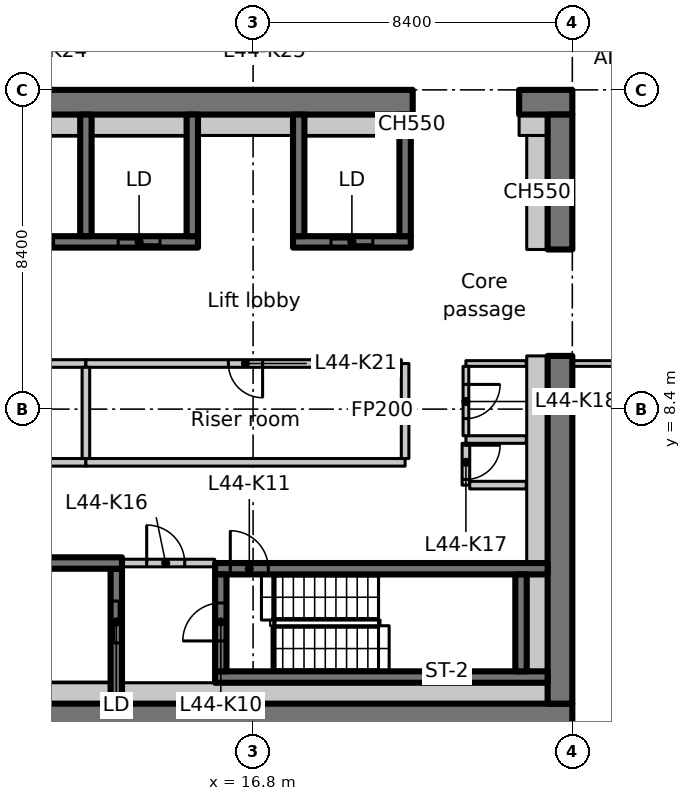
"""IFC4 building model, lengths in metres.
Left out: names, types, materials, properties, quantities, classifications, styles, units other than length and angle.
Written with IfcOpenShell. Run it as: python <this file> out.ifc"""

import sys

from ifc_helpers import new_model, si_unit, direction, frame, frame_2d, origin, place, context, subcontext, project, spatial, rectangle, extrude, element, fill, save


model = new_model("IFC4")
c1 = context("Model", 3, precision=1e-05, world=origin(), true_north=direction((0.0, 1.0)))
c2 = subcontext(c1, "Body", "Model", "MODEL_VIEW")
j1 = project(units=[si_unit("LENGTHUNIT", "METRE"), si_unit("PLANEANGLEUNIT", "RADIAN")], contexts=[c1])
p1 = place(None, origin())
s1 = spatial("IfcSite", under=j1, at=p1, CompositionType="ELEMENT")
p2 = place(p1, origin())
s2 = spatial("IfcBuilding", under=s1, at=p2, CompositionType="ELEMENT")
p3 = place(p2, frame((0.0, 0.0, 177.6)))
s3 = spatial("IfcBuildingStorey", under=s2, at=p3, CompositionType="ELEMENT", Elevation=177.6)
p4 = place(p3, frame((7.286, 0.325, 0.0), z_axis=(0.0, 0.0, 1.0), x_axis=(1.0, 0.0, 0.0)))
e1 = element("IfcWall", 1, at=p4, inside=s3, PredefinedType="SHEAR", context=c2, shape_type="SweptSolid", body=[
    extrude(rectangle(XDim=17.914, YDim=0.65, at=frame_2d((8.957, 0.0))), origin(), (0.0, 0.0, 1.0), 3.35),
])
p5 = place(p3, frame((-1.1, 16.475, 0.0), z_axis=(0.0, 0.0, 1.0), x_axis=(1.0, 0.0, 0.0)))
e2 = element("IfcWall", 2, at=p5, inside=s3, PredefinedType="SHEAR", context=c2, shape_type="SweptSolid", body=[
    extrude(rectangle(XDim=22.1, YDim=0.65, at=frame_2d((11.05, 0.0))), origin(), (0.0, 0.0, 1.0), 3.35),
])
p6 = place(p5, frame((3.15, 0.0, 0.0)))
e3 = element("IfcOpeningElement", 3, at=p6, cuts=e2, PredefinedType="OPENING", context=c2, shape_type="SweptSolid", body=[
    extrude(rectangle(XDim=1.1, YDim=2.3, at=frame_2d((0.55, 1.15))), frame((0.0, 0.335, 0.0), z_axis=(0.0, -1.0, 0.0), x_axis=(1.0, 0.0, 0.0)), (0.0, 0.0, 1.0), 0.67),
])
p7 = place(p3, frame((23.8, 16.475, 0.0), z_axis=(0.0, 0.0, 1.0), x_axis=(1.0, 0.0, 0.0)))
e4 = element("IfcWall", 4, at=p7, inside=s3, PredefinedType="SHEAR", context=c2, shape_type="SweptSolid", body=[
    extrude(rectangle(XDim=1.4, YDim=0.65, at=frame_2d((0.7, 0.0))), origin(), (0.0, 0.0, 1.0), 3.35),
])
p8 = place(p3, frame((24.875, 0.65, 0.0), z_axis=(0.0, 0.0, 1.0), x_axis=(0.0, 1.0, 0.0)))
e5 = element("IfcWall", 5, at=p8, inside=s3, PredefinedType="SHEAR", context=c2, shape_type="SweptSolid", body=[
    extrude(rectangle(XDim=9.15, YDim=0.65, at=frame_2d((4.575, 0.0))), origin(), (0.0, 0.0, 1.0), 3.35),
])
p9 = place(p3, frame((24.875, 12.6, 0.0), z_axis=(0.0, 0.0, 1.0), x_axis=(0.0, 1.0, 0.0)))
e6 = element("IfcWall", 6, at=p9, inside=s3, PredefinedType="SHEAR", context=c2, shape_type="SweptSolid", body=[
    extrude(rectangle(XDim=3.55, YDim=0.65, at=frame_2d((1.775, 0.0))), origin(), (0.0, 0.0, 1.0), 3.35),
])
p10 = place(p3, frame((24.275, 12.6, 0.0), z_axis=(0.0, 0.0, 1.0), x_axis=(0.0, 1.0, 0.0)))
e7 = element("IfcWall", 7, at=p10, inside=s3, PredefinedType="PARTITIONING", context=c2, shape_type="SweptSolid", body=[
    extrude(rectangle(XDim=3.0, YDim=0.55, at=frame_2d((1.5, 0.0))), origin(), (0.0, 0.0, 1.0), 3.35),
])
p11 = place(p3, frame((23.8, 15.875, 0.0), z_axis=(0.0, 0.0, 1.0), x_axis=(1.0, 0.0, 0.0)))
e8 = element("IfcWall", 8, at=p11, inside=s3, PredefinedType="PARTITIONING", context=c2, shape_type="SweptSolid", body=[
    extrude(rectangle(XDim=0.75, YDim=0.55, at=frame_2d((0.375, 0.0))), origin(), (0.0, 0.0, 1.0), 3.35),
])
p12 = place(p3, frame((0.65, 12.8, 0.0), z_axis=(0.0, 0.0, 1.0), x_axis=(1.0, 0.0, 0.0)))
e9 = element("IfcWall", 9, at=p12, inside=s3, PredefinedType="SHEAR", context=c2, shape_type="SweptSolid", body=[
    extrude(rectangle(XDim=14.7, YDim=0.3, at=frame_2d((7.35, 0.0))), origin(), (0.0, 0.0, 1.0), 3.35),
])
p13 = place(p12, frame((4.2, 0.0, 0.0)))
e10 = element("IfcOpeningElement", 10, at=p13, cuts=e9, PredefinedType="OPENING", context=c2, shape_type="SweptSolid", body=[
    extrude(rectangle(XDim=1.1, YDim=2.3, at=frame_2d((0.55, 1.15))), frame((0.0, 0.16, 0.0), z_axis=(0.0, -1.0, 0.0), x_axis=(1.0, 0.0, 0.0)), (0.0, 0.0, 1.0), 0.32),
])
p14 = place(p12, frame((7.0, 0.0, 0.0)))
e11 = element("IfcOpeningElement", 11, at=p14, cuts=e9, PredefinedType="OPENING", context=c2, shape_type="SweptSolid", body=[
    extrude(rectangle(XDim=1.1, YDim=2.3, at=frame_2d((0.55, 1.15))), frame((0.0, 0.16, 0.0), z_axis=(0.0, -1.0, 0.0), x_axis=(1.0, 0.0, 0.0)), (0.0, 0.0, 1.0), 0.32),
])
p15 = place(p12, frame((9.8, 0.0, 0.0)))
e12 = element("IfcOpeningElement", 12, at=p15, cuts=e9, PredefinedType="OPENING", context=c2, shape_type="SweptSolid", body=[
    extrude(rectangle(XDim=1.1, YDim=2.3, at=frame_2d((0.55, 1.15))), frame((0.0, 0.16, 0.0), z_axis=(0.0, -1.0, 0.0), x_axis=(1.0, 0.0, 0.0)), (0.0, 0.0, 1.0), 0.32),
])
p16 = place(p12, frame((12.6, 0.0, 0.0)))
e13 = element("IfcOpeningElement", 13, at=p16, cuts=e9, PredefinedType="OPENING", context=c2, shape_type="SweptSolid", body=[
    extrude(rectangle(XDim=1.1, YDim=2.3, at=frame_2d((0.55, 1.15))), frame((0.0, 0.16, 0.0), z_axis=(0.0, -1.0, 0.0), x_axis=(1.0, 0.0, 0.0)), (0.0, 0.0, 1.0), 0.32),
])
for number, where, z_axis, x_axis in (
    (14, (12.4, 12.95, 0.0), (0.0, 0.0, 1.0), (0.0, 1.0, 0.0)),
    (15, (15.2, 12.95, 0.0), (0.0, 0.0, 1.0), (0.0, 1.0, 0.0)),
):
    element("IfcWall", number, at=place(p3, frame(where, z_axis=z_axis, x_axis=x_axis)), inside=s3, PredefinedType="SHEAR", context=c2, shape_type="SweptSolid", body=[
        extrude(rectangle(XDim=3.2, YDim=0.3, at=frame_2d((1.6, 0.0))), origin(), (0.0, 0.0, 1.0), 3.35),
    ])
p17 = place(p3, frame((17.85, 12.8, 0.0), z_axis=(0.0, 0.0, 1.0), x_axis=(1.0, 0.0, 0.0)))
e16 = element("IfcWall", 16, at=p17, inside=s3, PredefinedType="SHEAR", context=c2, shape_type="SweptSolid", body=[
    extrude(rectangle(XDim=3.1, YDim=0.3, at=frame_2d((1.55, 0.0))), origin(), (0.0, 0.0, 1.0), 3.35),
])
p18 = place(p17, frame((1.0, 0.0, 0.0)))
e17 = element("IfcOpeningElement", 17, at=p18, cuts=e16, PredefinedType="OPENING", context=c2, shape_type="SweptSolid", body=[
    extrude(rectangle(XDim=1.1, YDim=2.3, at=frame_2d((0.55, 1.15))), frame((0.0, 0.16, 0.0), z_axis=(0.0, -1.0, 0.0), x_axis=(1.0, 0.0, 0.0)), (0.0, 0.0, 1.0), 0.32),
])
for number, where, z_axis, x_axis in (
    (18, (18.0, 12.95, 0.0), (0.0, 0.0, 1.0), (0.0, 1.0, 0.0)),
    (19, (20.8, 12.95, 0.0), (0.0, 0.0, 1.0), (0.0, 1.0, 0.0)),
):
    element("IfcWall", number, at=place(p3, frame(where, z_axis=z_axis, x_axis=x_axis)), inside=s3, PredefinedType="SHEAR", context=c2, shape_type="SweptSolid", body=[
        extrude(rectangle(XDim=3.2, YDim=0.3, at=frame_2d((1.6, 0.0))), origin(), (0.0, 0.0, 1.0), 3.35),
    ])
p19 = place(p3, frame((13.2, 0.65, 0.0), z_axis=(0.0, 0.0, 1.0), x_axis=(0.0, 1.0, 0.0)))
e20 = element("IfcWall", 20, at=p19, inside=s3, PredefinedType="SHEAR", context=c2, shape_type="SweptSolid", body=[
    extrude(rectangle(XDim=3.55, YDim=0.3, at=frame_2d((1.775, 0.0))), origin(), (0.0, 0.0, 1.0), 3.35),
])
p20 = place(p19, frame((1.6, 0.0, 0.0)))
e21 = element("IfcOpeningElement", 21, at=p20, cuts=e20, PredefinedType="OPENING", context=c2, shape_type="SweptSolid", body=[
    extrude(rectangle(XDim=1.1, YDim=2.3, at=frame_2d((0.55, 1.15))), frame((0.0, 0.16, 0.0), z_axis=(0.0, -1.0, 0.0), x_axis=(1.0, 0.0, 0.0)), (0.0, 0.0, 1.0), 0.32),
])
p21 = place(p3, frame((10.05, 4.35, 0.0), z_axis=(0.0, 0.0, 1.0), x_axis=(1.0, 0.0, 0.0)))
e22 = element("IfcWall", 22, at=p21, inside=s3, PredefinedType="SHEAR", context=c2, shape_type="SweptSolid", body=[
    extrude(rectangle(XDim=3.3, YDim=0.3, at=frame_2d((1.65, 0.0))), origin(), (0.0, 0.0, 1.0), 3.35),
])
p22 = place(p3, frame((15.8, 1.35, 0.0), z_axis=(0.0, 0.0, 1.0), x_axis=(1.0, 0.0, 0.0)))
e23 = element("IfcWall", 23, at=p22, inside=s3, PredefinedType="SHEAR", context=c2, shape_type="SweptSolid", body=[
    extrude(rectangle(XDim=8.75, YDim=0.3, at=frame_2d((4.375, 0.0))), origin(), (0.0, 0.0, 1.0), 3.35),
])
p23 = place(p3, frame((15.8, 4.2, 0.0), z_axis=(0.0, 0.0, 1.0), x_axis=(1.0, 0.0, 0.0)))
e24 = element("IfcWall", 24, at=p23, inside=s3, PredefinedType="SHEAR", context=c2, shape_type="SweptSolid", body=[
    extrude(rectangle(XDim=8.75, YDim=0.3, at=frame_2d((4.375, 0.0))), origin(), (0.0, 0.0, 1.0), 3.35),
])
p24 = place(p23, frame((0.4, 0.0, 0.0)))
e25 = element("IfcOpeningElement", 25, at=p24, cuts=e24, PredefinedType="OPENING", context=c2, shape_type="SweptSolid", body=[
    extrude(rectangle(XDim=1.0, YDim=2.1, at=frame_2d((0.5, 1.05))), frame((0.0, 0.16, 0.0), z_axis=(0.0, -1.0, 0.0), x_axis=(1.0, 0.0, 0.0)), (0.0, 0.0, 1.0), 0.32),
])
p25 = place(p3, frame((15.95, 1.5, 0.0), z_axis=(0.0, 0.0, 1.0), x_axis=(0.0, 1.0, 0.0)))
e26 = element("IfcWall", 26, at=p25, inside=s3, PredefinedType="SHEAR", context=c2, shape_type="SweptSolid", body=[
    extrude(rectangle(XDim=2.55, YDim=0.3, at=frame_2d((1.275, 0.0))), origin(), (0.0, 0.0, 1.0), 3.35),
])
p26 = place(p25, frame((0.8, 0.0, 0.0)))
e27 = element("IfcOpeningElement", 27, at=p26, cuts=e26, PredefinedType="OPENING", context=c2, shape_type="SweptSolid", body=[
    extrude(rectangle(XDim=1.0, YDim=2.1, at=frame_2d((0.5, 1.05))), frame((0.0, 0.16, 0.0), z_axis=(0.0, -1.0, 0.0), x_axis=(1.0, 0.0, 0.0)), (0.0, 0.0, 1.0), 0.32),
])
p27 = place(p3, frame((23.85, 1.5, 0.0), z_axis=(0.0, 0.0, 1.0), x_axis=(0.0, 1.0, 0.0)))
e28 = element("IfcWall", 28, at=p27, inside=s3, PredefinedType="SHEAR", context=c2, shape_type="SweptSolid", body=[
    extrude(rectangle(XDim=2.55, YDim=0.3, at=frame_2d((1.275, 0.0))), origin(), (0.0, 0.0, 1.0), 3.35),
])
p28 = place(p3, frame((13.362, 4.35, 0.0), z_axis=(0.0, 0.0, 1.0), x_axis=(1.0, 0.0, 0.0)))
e29 = element("IfcWall", 29, at=p28, inside=s3, PredefinedType="PARTITIONING", context=c2, shape_type="SweptSolid", body=[
    extrude(rectangle(XDim=2.426, YDim=0.2, at=frame_2d((1.213, 0.0))), origin(), (0.0, 0.0, 1.0), 3.35),
])
p29 = place(p28, frame((0.638, 0.0, 0.0)))
e30 = element("IfcOpeningElement", 30, at=p29, cuts=e29, PredefinedType="OPENING", context=c2, shape_type="SweptSolid", body=[
    extrude(rectangle(XDim=1.0, YDim=2.1, at=frame_2d((0.5, 1.05))), frame((0.0, 0.11, 0.0), z_axis=(0.0, -1.0, 0.0), x_axis=(1.0, 0.0, 0.0)), (0.0, 0.0, 1.0), 0.22),
])
p30 = place(p3, frame((6.8, 7.0, 0.0), z_axis=(0.0, 0.0, 1.0), x_axis=(1.0, 0.0, 0.0)))
e31 = element("IfcWall", 31, at=p30, inside=s3, PredefinedType="PARTITIONING", context=c2, shape_type="SweptSolid", body=[
    extrude(rectangle(XDim=5.6, YDim=0.2, at=frame_2d((2.8, 0.0))), origin(), (0.0, 0.0, 1.0), 3.35),
])
p31 = place(p3, frame((12.4, 9.6, 0.0), z_axis=(0.0, 0.0, 1.0), x_axis=(-1.0, 0.0, 0.0)))
e32 = element("IfcWall", 32, at=p31, inside=s3, PredefinedType="PARTITIONING", context=c2, shape_type="SweptSolid", body=[
    extrude(rectangle(XDim=5.5, YDim=0.2, at=frame_2d((2.75, 0.0))), origin(), (0.0, 0.0, 1.0), 3.35),
])
p32 = place(p31, frame((2.35, 0.0, 0.0)))
e33 = element("IfcOpeningElement", 33, at=p32, cuts=e32, PredefinedType="OPENING", context=c2, shape_type="SweptSolid", body=[
    extrude(rectangle(XDim=0.9, YDim=2.1, at=frame_2d((0.45, 1.05))), frame((0.0, 0.11, 0.0), z_axis=(0.0, -1.0, 0.0), x_axis=(1.0, 0.0, 0.0)), (0.0, 0.0, 1.0), 0.22),
])
p33 = place(p3, frame((12.4, 7.0, 0.0), z_axis=(0.0, 0.0, 1.0), x_axis=(1.0, 0.0, 0.0)))
e34 = element("IfcWall", 34, at=p33, inside=s3, PredefinedType="PARTITIONING", context=c2, shape_type="SweptSolid", body=[
    extrude(rectangle(XDim=8.4, YDim=0.2, at=frame_2d((4.2, 0.0))), origin(), (0.0, 0.0, 1.0), 3.35),
])
p34 = place(p3, frame((20.8, 7.1, 0.0), z_axis=(0.0, 0.0, 1.0), x_axis=(0.0, 1.0, 0.0)))
e35 = element("IfcWall", 35, at=p34, inside=s3, PredefinedType="PARTITIONING", context=c2, shape_type="SweptSolid", body=[
    extrude(rectangle(XDim=2.5, YDim=0.2, at=frame_2d((1.25, 0.0))), origin(), (0.0, 0.0, 1.0), 3.35),
])
p35 = place(p3, frame((20.7, 9.6, 0.0), z_axis=(0.0, 0.0, 1.0), x_axis=(-1.0, 0.0, 0.0)))
e36 = element("IfcWall", 36, at=p35, inside=s3, PredefinedType="PARTITIONING", context=c2, shape_type="SweptSolid", body=[
    extrude(rectangle(XDim=8.3, YDim=0.2, at=frame_2d((4.15, 0.0))), origin(), (0.0, 0.0, 1.0), 3.35),
])
p36 = place(p35, frame((3.65, 0.0, 0.0)))
e37 = element("IfcOpeningElement", 37, at=p36, cuts=e36, PredefinedType="OPENING", context=c2, shape_type="SweptSolid", body=[
    extrude(rectangle(XDim=0.9, YDim=2.1, at=frame_2d((0.45, 1.05))), frame((0.0, 0.11, 0.0), z_axis=(0.0, -1.0, 0.0), x_axis=(1.0, 0.0, 0.0)), (0.0, 0.0, 1.0), 0.22),
])
p37 = place(p3, frame((12.4, 9.5, 0.0), z_axis=(0.0, 0.0, 1.0), x_axis=(0.0, -1.0, 0.0)))
e38 = element("IfcWall", 38, at=p37, inside=s3, PredefinedType="PARTITIONING", context=c2, shape_type="SweptSolid", body=[
    extrude(rectangle(XDim=2.4, YDim=0.2, at=frame_2d((1.2, 0.0))), origin(), (0.0, 0.0, 1.0), 3.35),
])
p38 = place(p3, frame((23.988, 7.6, 0.0), z_axis=(0.0, 0.0, 1.0), x_axis=(-1.0, 0.0, 0.0)))
e39 = element("IfcWall", 39, at=p38, inside=s3, PredefinedType="PARTITIONING", context=c2, shape_type="SweptSolid", body=[
    extrude(rectangle(XDim=1.588, YDim=0.2, at=frame_2d((0.794, 0.0))), origin(), (0.0, 0.0, 1.0), 3.35),
])
p39 = place(p3, frame((22.4, 7.5, 0.0), z_axis=(0.0, 0.0, 1.0), x_axis=(0.0, -1.0, 0.0)))
e40 = element("IfcWall", 40, at=p39, inside=s3, PredefinedType="PARTITIONING", context=c2, shape_type="SweptSolid", body=[
    extrude(rectangle(XDim=1.1, YDim=0.2, at=frame_2d((0.55, 0.0))), origin(), (0.0, 0.0, 1.0), 3.35),
])
p40 = place(p39, frame((0.05, 0.0, 0.0)))
e41 = element("IfcOpeningElement", 41, at=p40, cuts=e40, PredefinedType="OPENING", context=c2, shape_type="SweptSolid", body=[
    extrude(rectangle(XDim=0.9, YDim=2.1, at=frame_2d((0.45, 1.05))), frame((0.0, 0.11, 0.0), z_axis=(0.0, -1.0, 0.0), x_axis=(1.0, 0.0, 0.0)), (0.0, 0.0, 1.0), 0.22),
])
p41 = place(p3, frame((22.5, 6.4, 0.0), z_axis=(0.0, 0.0, 1.0), x_axis=(1.0, 0.0, 0.0)))
e42 = element("IfcWall", 42, at=p41, inside=s3, PredefinedType="PARTITIONING", context=c2, shape_type="SweptSolid", body=[
    extrude(rectangle(XDim=1.488, YDim=0.2, at=frame_2d((0.744, 0.0))), origin(), (0.0, 0.0, 1.0), 3.35),
])
p42 = place(p3, frame((23.988, 9.6, 0.0), z_axis=(0.0, 0.0, 1.0), x_axis=(-1.0, 0.0, 0.0)))
e43 = element("IfcWall", 43, at=p42, inside=s3, PredefinedType="PARTITIONING", context=c2, shape_type="SweptSolid", body=[
    extrude(rectangle(XDim=1.588, YDim=0.15, at=frame_2d((0.794, 0.0))), origin(), (0.0, 0.0, 1.0), 3.35),
])
p43 = place(p3, frame((22.4, 9.525, 0.0), z_axis=(0.0, 0.0, 1.0), x_axis=(0.0, -1.0, 0.0)))
e44 = element("IfcWall", 44, at=p43, inside=s3, PredefinedType="PARTITIONING", context=c2, shape_type="SweptSolid", body=[
    extrude(rectangle(XDim=1.825, YDim=0.15, at=frame_2d((0.913, 0.0))), origin(), (0.0, 0.0, 1.0), 3.35),
])
p44 = place(p43, frame((0.475, 0.0, 0.0)))
e45 = element("IfcOpeningElement", 45, at=p44, cuts=e44, PredefinedType="OPENING", context=c2, shape_type="SweptSolid", body=[
    extrude(rectangle(XDim=0.9, YDim=2.1, at=frame_2d((0.45, 1.05))), frame((0.0, 0.085, 0.0), z_axis=(0.0, -1.0, 0.0), x_axis=(1.0, 0.0, 0.0)), (0.0, 0.0, 1.0), 0.17),
])
for number, where, z_axis, x_axis in (
    (46, (9.75, 15.875, 0.0), (0.0, 0.0, 1.0), (1.0, 0.0, 0.0)),
    (47, (12.55, 15.875, 0.0), (0.0, 0.0, 1.0), (1.0, 0.0, 0.0)),
    (48, (15.35, 15.875, 0.0), (0.0, 0.0, 1.0), (1.0, 0.0, 0.0)),
    (49, (18.15, 15.875, 0.0), (0.0, 0.0, 1.0), (1.0, 0.0, 0.0)),
):
    element("IfcWall", number, at=place(p3, frame(where, z_axis=z_axis, x_axis=x_axis)), inside=s3, PredefinedType="PARTITIONING", context=c2, shape_type="SweptSolid", body=[
        extrude(rectangle(XDim=2.5, YDim=0.55, at=frame_2d((1.25, 0.0))), origin(), (0.0, 0.0, 1.0), 3.35),
    ])
p45 = place(p3, frame((20.95, 15.875, 0.0), z_axis=(0.0, 0.0, 1.0), x_axis=(1.0, 0.0, 0.0)))
e50 = element("IfcWall", 50, at=p45, inside=s3, PredefinedType="PARTITIONING", context=c2, shape_type="SweptSolid", body=[
    extrude(rectangle(XDim=0.05, YDim=0.55, at=frame_2d((0.025, 0.0))), origin(), (0.0, 0.0, 1.0), 3.35),
])
p46 = place(p3, frame((10.35, 0.925, 0.0), z_axis=(0.0, 0.0, 1.0), x_axis=(1.0, 0.0, 0.0)))
e51 = element("IfcWall", 51, at=p46, inside=s3, PredefinedType="PARTITIONING", context=c2, shape_type="SweptSolid", body=[
    extrude(rectangle(XDim=2.7, YDim=0.55, at=frame_2d((1.35, 0.0))), origin(), (0.0, 0.0, 1.0), 3.35),
])
p47 = place(p3, frame((13.35, 0.925, 0.0), z_axis=(0.0, 0.0, 1.0), x_axis=(1.0, 0.0, 0.0)))
e52 = element("IfcWall", 52, at=p47, inside=s3, PredefinedType="PARTITIONING", context=c2, shape_type="SweptSolid", body=[
    extrude(rectangle(XDim=11.2, YDim=0.55, at=frame_2d((5.6, 0.0))), origin(), (0.0, 0.0, 1.0), 3.35),
])
p48 = place(p3, frame((24.275, 1.5, 0.0), z_axis=(0.0, 0.0, 1.0), x_axis=(0.0, 1.0, 0.0)))
e53 = element("IfcWall", 53, at=p48, inside=s3, PredefinedType="PARTITIONING", context=c2, shape_type="SweptSolid", body=[
    extrude(rectangle(XDim=2.55, YDim=0.55, at=frame_2d((1.275, 0.0))), origin(), (0.0, 0.0, 1.0), 3.35),
])
p49 = place(p3, frame((24.275, 4.35, 0.0), z_axis=(0.0, 0.0, 1.0), x_axis=(0.0, 1.0, 0.0)))
e54 = element("IfcWall", 54, at=p49, inside=s3, PredefinedType="PARTITIONING", context=c2, shape_type="SweptSolid", body=[
    extrude(rectangle(XDim=5.45, YDim=0.55, at=frame_2d((2.725, 0.0))), origin(), (0.0, 0.0, 1.0), 3.35),
])
p50 = place(p3, frame((29.4, 9.6, 0.0), z_axis=(0.0, 0.0, 1.0), x_axis=(-1.0, 0.0, 0.0)))
e55 = element("IfcWall", 55, at=p50, inside=s3, PredefinedType="PARTITIONING", context=c2, shape_type="SweptSolid", body=[
    extrude(rectangle(XDim=4.2, YDim=0.15, at=frame_2d((2.1, 0.0))), origin(), (0.0, 0.0, 1.0), 3.33),
])
p51 = place(p15, origin())
e56 = element("IfcDoor", 56, at=p51, inside=s3, OperationType="SLIDING_TO_LEFT", PredefinedType="DOOR", context=c2, shape_type="SweptSolid", body=[
    extrude(rectangle(XDim=1.1, YDim=2.3, at=frame_2d((0.55, 1.15))), frame((0.0, 0.025, 0.0), z_axis=(0.0, -1.0, 0.0), x_axis=(1.0, 0.0, 0.0)), (0.0, 0.0, 1.0), 0.05),
])
fill(e12, e56)
p52 = place(p16, origin())
e57 = element("IfcDoor", 57, at=p52, inside=s3, OperationType="SLIDING_TO_LEFT", PredefinedType="DOOR", context=c2, shape_type="SweptSolid", body=[
    extrude(rectangle(XDim=1.1, YDim=2.3, at=frame_2d((0.55, 1.15))), frame((0.0, 0.025, 0.0), z_axis=(0.0, -1.0, 0.0), x_axis=(1.0, 0.0, 0.0)), (0.0, 0.0, 1.0), 0.05),
])
fill(e13, e57)
p53 = place(p18, origin())
e58 = element("IfcDoor", 58, at=p53, inside=s3, OperationType="SLIDING_TO_LEFT", PredefinedType="DOOR", context=c2, shape_type="SweptSolid", body=[
    extrude(rectangle(XDim=1.1, YDim=2.3, at=frame_2d((0.55, 1.15))), frame((0.0, 0.025, 0.0), z_axis=(0.0, -1.0, 0.0), x_axis=(1.0, 0.0, 0.0)), (0.0, 0.0, 1.0), 0.05),
])
fill(e17, e58)
p54 = place(p20, origin())
e59 = element("IfcDoor", 59, at=p54, inside=s3, OperationType="SLIDING_TO_LEFT", PredefinedType="DOOR", context=c2, shape_type="SweptSolid", body=[
    extrude(rectangle(XDim=1.1, YDim=2.3, at=frame_2d((0.55, 1.15))), frame((0.0, 0.025, 0.0), z_axis=(0.0, -1.0, 0.0), x_axis=(1.0, 0.0, 0.0)), (0.0, 0.0, 1.0), 0.05),
])
fill(e21, e59)
p55 = place(p26, origin())
e60 = element("IfcDoor", 60, at=p55, inside=s3, OperationType="SINGLE_SWING_LEFT", PredefinedType="DOOR", context=c2, shape_type="SweptSolid", body=[
    extrude(rectangle(XDim=1.0, YDim=2.1, at=frame_2d((0.5, 1.05))), frame((0.0, 0.025, 0.0), z_axis=(0.0, -1.0, 0.0), x_axis=(1.0, 0.0, 0.0)), (0.0, 0.0, 1.0), 0.05),
])
fill(e27, e60)
p56 = place(p24, origin())
e61 = element("IfcDoor", 61, at=p56, inside=s3, OperationType="SINGLE_SWING_RIGHT", PredefinedType="DOOR", context=c2, shape_type="SweptSolid", body=[
    extrude(rectangle(XDim=1.0, YDim=2.1, at=frame_2d((0.5, 1.05))), frame((0.0, 0.025, 0.0), z_axis=(0.0, -1.0, 0.0), x_axis=(1.0, 0.0, 0.0)), (0.0, 0.0, 1.0), 0.05),
])
fill(e25, e61)
p57 = place(p29, origin())
e62 = element("IfcDoor", 62, at=p57, inside=s3, OperationType="SINGLE_SWING_LEFT", PredefinedType="DOOR", context=c2, shape_type="SweptSolid", body=[
    extrude(rectangle(XDim=1.0, YDim=2.1, at=frame_2d((0.5, 1.05))), frame((0.0, 0.025, 0.0), z_axis=(0.0, -1.0, 0.0), x_axis=(1.0, 0.0, 0.0)), (0.0, 0.0, 1.0), 0.05),
])
fill(e30, e62)
p58 = place(p40, origin())
e63 = element("IfcDoor", 63, at=p58, inside=s3, OperationType="SINGLE_SWING_RIGHT", PredefinedType="DOOR", context=c2, shape_type="SweptSolid", body=[
    extrude(rectangle(XDim=0.9, YDim=2.1, at=frame_2d((0.45, 1.05))), frame((0.0, 0.025, 0.0), z_axis=(0.0, -1.0, 0.0), x_axis=(1.0, 0.0, 0.0)), (0.0, 0.0, 1.0), 0.05),
])
fill(e41, e63)
p59 = place(p44, origin())
e64 = element("IfcDoor", 64, at=p59, inside=s3, OperationType="SINGLE_SWING_LEFT", PredefinedType="DOOR", context=c2, shape_type="SweptSolid", body=[
    extrude(rectangle(XDim=0.9, YDim=2.1, at=frame_2d((0.45, 1.05))), frame((0.0, 0.025, 0.0), z_axis=(0.0, -1.0, 0.0), x_axis=(1.0, 0.0, 0.0)), (0.0, 0.0, 1.0), 0.05),
])
fill(e45, e64)
p60 = place(p36, origin())
e65 = element("IfcDoor", 65, at=p60, inside=s3, OperationType="SINGLE_SWING_RIGHT", PredefinedType="DOOR", context=c2, shape_type="SweptSolid", body=[
    extrude(rectangle(XDim=0.9, YDim=2.1, at=frame_2d((0.45, 1.05))), frame((0.0, 0.025, 0.0), z_axis=(0.0, -1.0, 0.0), x_axis=(1.0, 0.0, 0.0)), (0.0, 0.0, 1.0), 0.05),
])
fill(e37, e65)
save(model, sys.argv[1])
